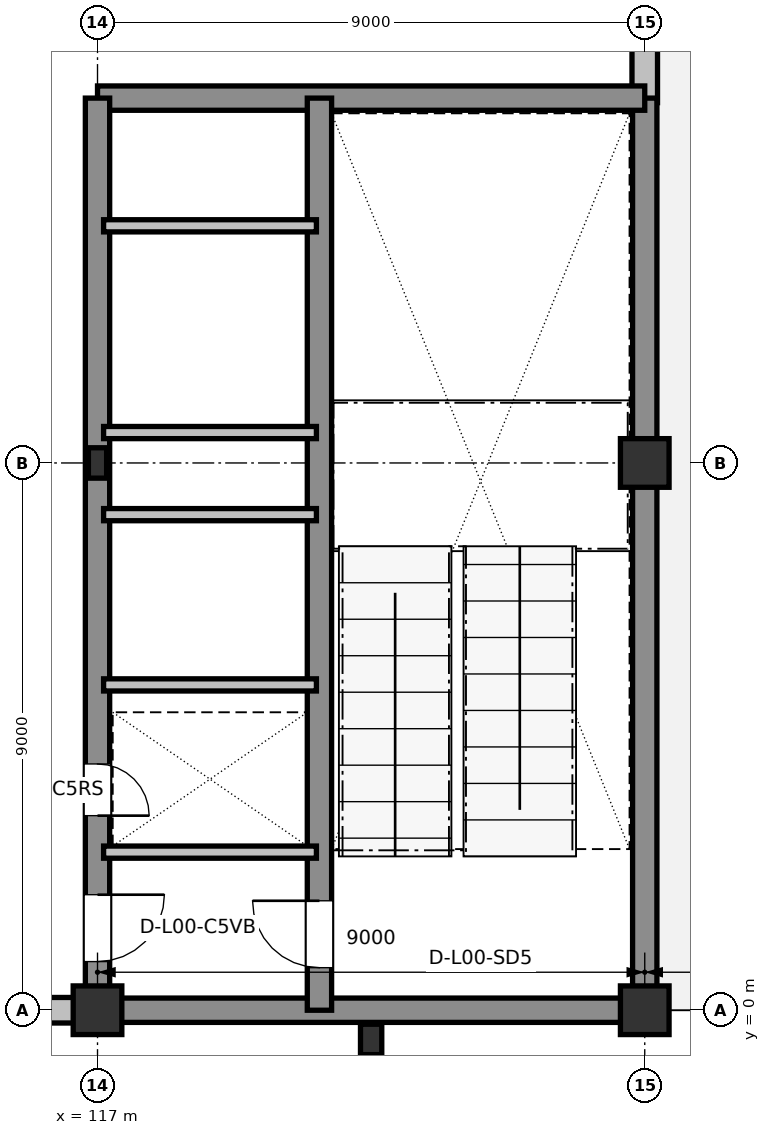
"""IFC4 building model, lengths in metres.
Left out: names, types, materials, properties, quantities, classifications, styles, units other than length and angle.
Written with IfcOpenShell. Run it as: python <this file> out.ifc"""

import sys

from ifc_helpers import new_model, si_unit, direction, frame, frame_2d, origin, origin_2d, place, context, subcontext, project, spatial, rectangle, i_section, extrude, element, fill, save


model = new_model("IFC4")
c1 = context("Model", 3, precision=1e-05, world=origin(), true_north=direction((0.0, 1.0)))
c2 = subcontext(c1, "Body", "Model", "MODEL_VIEW")
j1 = project(units=[si_unit("LENGTHUNIT", "METRE"), si_unit("PLANEANGLEUNIT", "RADIAN")], contexts=[c1])
p1 = place(None, origin())
s1 = spatial("IfcSite", under=j1, at=p1, CompositionType="ELEMENT")
p2 = place(p1, origin())
s2 = spatial("IfcBuilding", under=s1, at=p2, CompositionType="ELEMENT")
p3 = place(p2, origin())
s3 = spatial("IfcBuildingStorey", under=s2, at=p3, CompositionType="ELEMENT", Elevation=0.0)
p4 = place(p3, frame((121.5, -0.48, 0.0), z_axis=(0.0, 0.0, 1.0), x_axis=(1.0, 0.0, 0.0)))
e1 = element("IfcColumn", 1, at=p4, inside=s3, PredefinedType="PILASTER", context=c2, shape_type="SweptSolid", body=[
    extrude(rectangle(XDim=0.35, YDim=0.5, at=origin_2d()), origin(), (0.0, 0.0, 1.0), 5.4),
])
p5 = place(p3, frame((117.0, 0.0, 0.0), z_axis=(0.0, 0.0, 1.0), x_axis=(1.0, 0.0, 0.0)))
e2 = element("IfcColumn", 2, at=p5, inside=s3, PredefinedType="COLUMN", context=c2, shape_type="SweptSolid", body=[
    extrude(rectangle(XDim=0.8, YDim=0.8, at=origin_2d()), origin(), (0.0, 0.0, 1.0), 5.4),
])
p6 = place(p3, frame((117.0, 9.0, 0.0), z_axis=(0.0, 0.0, 1.0), x_axis=(1.0, 0.0, 0.0)))
e3 = element("IfcColumn", 3, at=p6, inside=s3, PredefinedType="COLUMN", context=c2, shape_type="SweptSolid", body=[
    extrude(i_section(OverallWidth=0.3, OverallDepth=0.5, WebThickness=0.014, FlangeThickness=0.028, at=origin_2d()), origin(), (0.0, 0.0, 1.0), 5.4),
])
for number, where, z_axis, x_axis in (
    (4, (126.0, 0.0, 0.0), (0.0, 0.0, 1.0), (1.0, 0.0, 0.0)),
    (5, (126.0, 9.0, 0.0), (0.0, 0.0, 1.0), (1.0, 0.0, 0.0)),
):
    element("IfcColumn", number, at=place(p3, frame(where, z_axis=z_axis, x_axis=x_axis)), inside=s3, PredefinedType="COLUMN", context=c2, shape_type="SweptSolid", body=[
        extrude(rectangle(XDim=0.8, YDim=0.8, at=origin_2d()), origin(), (0.0, 0.0, 1.0), 5.4),
    ])
p7 = place(p3, frame((108.385, 0.0, 0.0), z_axis=(0.0, 0.0, 1.0), x_axis=(1.0, 0.0, 0.0)))
e6 = element("IfcWall", 6, at=p7, inside=s3, PredefinedType="STANDARD", context=c2, shape_type="SweptSolid", body=[
    extrude(rectangle(XDim=8.23, YDim=0.42, at=frame_2d((4.115, 0.0))), origin(), (0.0, 0.0, 1.0), 4.795),
])
p8 = place(p7, frame((0.94, 0.0, 0.0)))
e7 = element("IfcOpeningElement", 7, at=p8, cuts=e6, PredefinedType="OPENING", context=c2, shape_type="SweptSolid", body=[
    extrude(rectangle(XDim=1.75, YDim=2.35, at=frame_2d((0.875, 1.175))), frame((0.0, 0.22, 0.0), z_axis=(0.0, -1.0, 0.0), x_axis=(1.0, 0.0, 0.0)), (0.0, 0.0, 1.0), 0.44),
])
p9 = place(p3, frame((126.0, 14.925, 0.0), z_axis=(0.0, 0.0, 1.0), x_axis=(0.0, 1.0, 0.0)))
e8 = element("IfcWall", 8, at=p9, inside=s3, PredefinedType="STANDARD", context=c2, shape_type="SweptSolid", body=[
    extrude(rectangle(XDim=2.69, YDim=0.42, at=frame_2d((1.345, 0.0))), origin(), (0.0, 0.0, 1.0), 4.755),
])
p10 = place(p3, frame((117.0, 0.0, 0.0), z_axis=(0.0, 0.0, 1.0), x_axis=(1.0, 0.0, 0.0)))
e9 = element("IfcWall", 9, at=p10, inside=s3, PredefinedType="SHEAR", context=c2, shape_type="SweptSolid", body=[
    extrude(rectangle(XDim=9.0, YDim=0.4, at=frame_2d((4.5, 0.0))), origin(), (0.0, 0.0, 1.0), 5.16),
])
p11 = place(p10, frame((5.45, 0.0, 0.0)))
e10 = element("IfcOpeningElement", 10, at=p11, cuts=e9, PredefinedType="OPENING", context=c2, shape_type="SweptSolid", body=[
    extrude(rectangle(XDim=1.7, YDim=2.3, at=frame_2d((0.85, 1.15))), frame((0.0, 0.21, 0.0), z_axis=(0.0, -1.0, 0.0), x_axis=(1.0, 0.0, 0.0)), (0.0, 0.0, 1.0), 0.42),
])
p12 = place(p3, frame((126.0, 0.0, 0.0), z_axis=(0.0, 0.0, 1.0), x_axis=(0.0, 1.0, 0.0)))
e11 = element("IfcWall", 11, at=p12, inside=s3, PredefinedType="SHEAR", context=c2, shape_type="SweptSolid", body=[
    extrude(rectangle(XDim=15.0, YDim=0.4, at=frame_2d((7.5, 0.0))), origin(), (0.0, 0.0, 1.0), 5.16),
])
p13 = place(p3, frame((126.0, 15.0, 0.0), z_axis=(0.0, 0.0, 1.0), x_axis=(-1.0, 0.0, 0.0)))
e12 = element("IfcWall", 12, at=p13, inside=s3, PredefinedType="SHEAR", context=c2, shape_type="SweptSolid", body=[
    extrude(rectangle(XDim=9.0, YDim=0.4, at=frame_2d((4.5, 0.0))), origin(), (0.0, 0.0, 1.0), 5.16),
])
p14 = place(p3, frame((117.0, 15.0, 0.0), z_axis=(0.0, 0.0, 1.0), x_axis=(0.0, -1.0, 0.0)))
e13 = element("IfcWall", 13, at=p14, inside=s3, PredefinedType="SHEAR", context=c2, shape_type="SweptSolid", body=[
    extrude(rectangle(XDim=15.0, YDim=0.4, at=frame_2d((7.5, 0.0))), origin(), (0.0, 0.0, 1.0), 5.16),
])
p15 = place(p14, frame((13.1, 0.0, 0.0)))
e14 = element("IfcOpeningElement", 14, at=p15, cuts=e13, PredefinedType="OPENING", context=c2, shape_type="SweptSolid", body=[
    extrude(rectangle(XDim=1.1, YDim=2.16, at=frame_2d((0.55, 1.08))), frame((0.0, 0.21, 0.0), z_axis=(0.0, -1.0, 0.0), x_axis=(1.0, 0.0, 0.0)), (0.0, 0.0, 1.0), 0.42),
])
p16 = place(p14, frame((10.95, 0.0, 0.0)))
e15 = element("IfcOpeningElement", 15, at=p16, cuts=e13, PredefinedType="OPENING", context=c2, shape_type="SweptSolid", body=[
    extrude(rectangle(XDim=0.85, YDim=2.1, at=frame_2d((0.425, 1.05))), frame((0.0, 0.21, 0.0), z_axis=(0.0, -1.0, 0.0), x_axis=(1.0, 0.0, 0.0)), (0.0, 0.0, 1.0), 0.42),
])
p17 = place(p3, frame((120.65, 0.0, 0.0), z_axis=(0.0, 0.0, 1.0), x_axis=(0.0, 1.0, 0.0)))
e16 = element("IfcWall", 16, at=p17, inside=s3, PredefinedType="SHEAR", context=c2, shape_type="SweptSolid", body=[
    extrude(rectangle(XDim=15.0, YDim=0.4, at=frame_2d((7.5, 0.0))), origin(), (0.0, 0.0, 1.0), 5.16),
])
p18 = place(p17, frame((0.7, 0.0, 0.0)))
e17 = element("IfcOpeningElement", 17, at=p18, cuts=e16, PredefinedType="OPENING", context=c2, shape_type="SweptSolid", body=[
    extrude(rectangle(XDim=1.1, YDim=2.16, at=frame_2d((0.55, 1.08))), frame((0.0, 0.21, 0.0), z_axis=(0.0, -1.0, 0.0), x_axis=(1.0, 0.0, 0.0)), (0.0, 0.0, 1.0), 0.42),
])
for number, where, z_axis, x_axis in (
    (18, (117.1, 2.6, 0.0), (0.0, 0.0, 1.0), (1.0, 0.0, 0.0)),
    (19, (117.1, 5.35, 0.0), (0.0, 0.0, 1.0), (1.0, 0.0, 0.0)),
    (20, (117.1, 8.15, 0.0), (0.0, 0.0, 1.0), (1.0, 0.0, 0.0)),
    (21, (117.1, 9.5, 0.0), (0.0, 0.0, 1.0), (1.0, 0.0, 0.0)),
    (22, (117.1, 12.9, 0.0), (0.0, 0.0, 1.0), (1.0, 0.0, 0.0)),
):
    element("IfcWall", number, at=place(p3, frame(where, z_axis=z_axis, x_axis=x_axis)), inside=s3, PredefinedType="PARTITIONING", context=c2, shape_type="SweptSolid", body=[
        extrude(rectangle(XDim=3.5, YDim=0.2, at=frame_2d((1.75, 0.0))), origin(), (0.0, 0.0, 1.0), 5.16),
    ])
p19 = place(p11, frame((1.7, 0.0, 0.0), z_axis=(0.0, 0.0, 1.0), x_axis=(-1.0, 0.0, 0.0)))
e23 = element("IfcDoor", 23, at=p19, inside=s3, OperationType="DOUBLE_DOOR_SINGLE_SWING", PredefinedType="DOOR", context=c2, shape_type="SweptSolid", body=[
    extrude(rectangle(XDim=1.7, YDim=2.3, at=frame_2d((0.85, 1.15))), frame((0.0, 0.025, 0.0), z_axis=(0.0, -1.0, 0.0), x_axis=(1.0, 0.0, 0.0)), (0.0, 0.0, 1.0), 0.05),
])
fill(e10, e23)
p20 = place(p18, origin())
e24 = element("IfcDoor", 24, at=p20, inside=s3, OperationType="SINGLE_SWING_RIGHT", PredefinedType="DOOR", context=c2, shape_type="SweptSolid", body=[
    extrude(rectangle(XDim=1.1, YDim=2.16, at=frame_2d((0.55, 1.08))), frame((0.0, 0.025, 0.0), z_axis=(0.0, -1.0, 0.0), x_axis=(1.0, 0.0, 0.0)), (0.0, 0.0, 1.0), 0.05),
])
fill(e17, e24)
p21 = place(p15, origin())
e25 = element("IfcDoor", 25, at=p21, inside=s3, OperationType="SINGLE_SWING_LEFT", PredefinedType="DOOR", context=c2, shape_type="SweptSolid", body=[
    extrude(rectangle(XDim=1.1, YDim=2.16, at=frame_2d((0.55, 1.08))), frame((0.0, 0.025, 0.0), z_axis=(0.0, -1.0, 0.0), x_axis=(1.0, 0.0, 0.0)), (0.0, 0.0, 1.0), 0.05),
])
fill(e14, e25)
p22 = place(p16, origin())
e26 = element("IfcDoor", 26, at=p22, inside=s3, OperationType="SINGLE_SWING_RIGHT", PredefinedType="DOOR", context=c2, shape_type="SweptSolid", body=[
    extrude(rectangle(XDim=0.85, YDim=2.1, at=frame_2d((0.425, 1.05))), frame((0.0, 0.025, 0.0), z_axis=(0.0, -1.0, 0.0), x_axis=(1.0, 0.0, 0.0)), (0.0, 0.0, 1.0), 0.05),
])
fill(e15, e26)
save(model, sys.argv[1])
